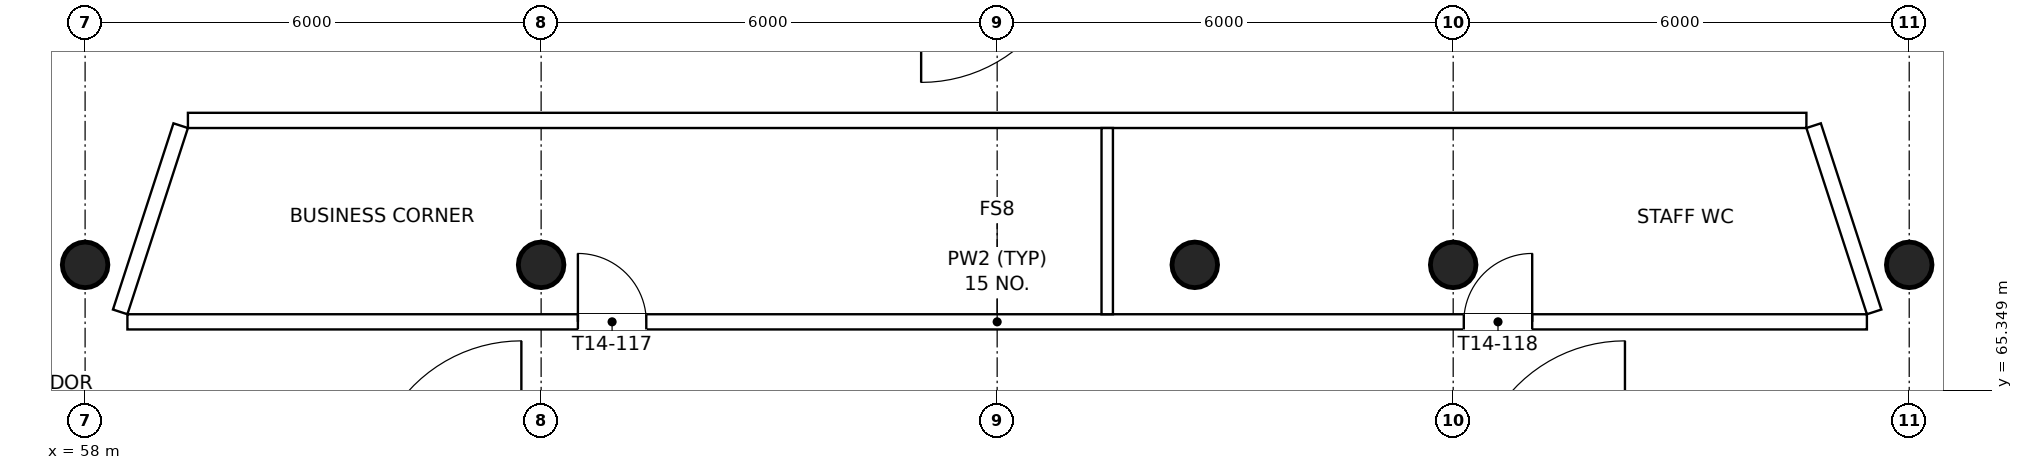
"""IFC4 building model, lengths in metres.
Left out: names, types, materials, properties, quantities, classifications, styles, units other than length and angle.
Written with IfcOpenShell. Run it as: python <this file> out.ifc"""

import sys

from ifc_helpers import new_model, si_unit, direction, frame, frame_2d, origin, origin_2d, place, context, subcontext, project, spatial, rectangle, circle, extrude, element, fill, save


model = new_model("IFC4")
c1 = context("Model", 3, precision=1e-05, world=origin(), true_north=direction((0.0, 1.0)))
c2 = subcontext(c1, "Body", "Model", "MODEL_VIEW")
j1 = project(units=[si_unit("LENGTHUNIT", "METRE"), si_unit("PLANEANGLEUNIT", "RADIAN")], contexts=[c1])
p1 = place(None, origin())
s1 = spatial("IfcSite", under=j1, at=p1, CompositionType="ELEMENT")
p2 = place(p1, origin())
s2 = spatial("IfcBuilding", under=s1, at=p2, CompositionType="ELEMENT")
p3 = place(p2, frame((0.0, 0.0, 204.3)))
s3 = spatial("IfcBuildingStorey", under=s2, at=p3, CompositionType="ELEMENT", Elevation=204.3)
for number, where, z_axis, x_axis in (
    (1, (58.0, 67.0, 0.0), (0.0, 0.0, 1.0), (1.0, 0.0, 0.0)),
    (2, (64.0, 67.0, 0.0), (0.0, 0.0, 1.0), (1.0, 0.0, 0.0)),
    (3, (72.6, 67.0, 0.0), (0.0, 0.0, 1.0), (1.0, 0.0, 0.0)),
    (4, (76.0, 67.0, 0.0), (0.0, 0.0, 1.0), (1.0, 0.0, 0.0)),
    (5, (82.0, 67.0, 0.0), (0.0, 0.0, 1.0), (1.0, 0.0, 0.0)),
):
    element("IfcColumn", number, at=place(p3, frame(where, z_axis=z_axis, x_axis=x_axis)), inside=s3, PredefinedType="COLUMN", context=c2, shape_type="SweptSolid", body=[
        extrude(circle(Radius=0.3, at=origin_2d()), origin(), (0.0, 0.0, 1.0), 3.9),
    ])
p4 = place(p3, frame((58.557, 66.25, 0.0), z_axis=(0.0, 0.0, 1.0), x_axis=(1.0, 0.0, 0.0)))
e6 = element("IfcWall", 6, at=p4, inside=s3, PredefinedType="PARTITIONING", context=c2, shape_type="SweptSolid", body=[
    extrude(rectangle(XDim=22.887, YDim=0.2, at=frame_2d((11.443, 0.0))), origin(), (0.0, 0.0, 1.0), 3.6),
])
p5 = place(p4, frame((5.927, 0.0, 0.0)))
e7 = element("IfcOpeningElement", 7, at=p5, cuts=e6, PredefinedType="OPENING", context=c2, shape_type="SweptSolid", body=[
    extrude(rectangle(XDim=0.9, YDim=2.1, at=frame_2d((0.45, 1.05))), frame((0.0, 0.11, 0.0), z_axis=(0.0, -1.0, 0.0), x_axis=(1.0, 0.0, 0.0)), (0.0, 0.0, 1.0), 0.22),
])
p6 = place(p4, frame((17.583, 0.0, 0.0)))
e8 = element("IfcOpeningElement", 8, at=p6, cuts=e6, PredefinedType="OPENING", context=c2, shape_type="SweptSolid", body=[
    extrude(rectangle(XDim=0.9, YDim=2.1, at=frame_2d((0.45, 1.05))), frame((0.0, 0.11, 0.0), z_axis=(0.0, -1.0, 0.0), x_axis=(1.0, 0.0, 0.0)), (0.0, 0.0, 1.0), 0.22),
])
p7 = place(p3, frame((81.538, 66.381, 0.0), z_axis=(0.0, 0.0, 1.0), x_axis=(-0.309053927645, 0.951044515155, 0.0)))
e9 = element("IfcWall", 9, at=p7, inside=s3, PredefinedType="PARTITIONING", context=c2, shape_type="SweptSolid", body=[
    extrude(rectangle(XDim=2.576, YDim=0.2, at=frame_2d((1.288, 0.0))), origin(), (0.0, 0.0, 1.0), 3.6),
])
p8 = place(p3, frame((80.647, 68.9, 0.0), z_axis=(0.0, 0.0, 1.0), x_axis=(-1.0, 0.0, 0.0)))
e10 = element("IfcWall", 10, at=p8, inside=s3, PredefinedType="PARTITIONING", context=c2, shape_type="SweptSolid", body=[
    extrude(rectangle(XDim=21.294, YDim=0.2, at=frame_2d((10.647, 0.0))), origin(), (0.0, 0.0, 1.0), 3.6),
])
p9 = place(p3, frame((59.258, 68.831, 0.0), z_axis=(0.0, 0.0, 1.0), x_axis=(-0.309053927645, -0.951044515155, 0.0)))
e11 = element("IfcWall", 11, at=p9, inside=s3, PredefinedType="PARTITIONING", context=c2, shape_type="SweptSolid", body=[
    extrude(rectangle(XDim=2.576, YDim=0.2, at=frame_2d((1.288, 0.0))), origin(), (0.0, 0.0, 1.0), 3.6),
])
p10 = place(p3, frame((71.448, 66.35, 0.0), z_axis=(0.0, 0.0, 1.0), x_axis=(0.0, 1.0, 0.0)))
e12 = element("IfcWall", 12, at=p10, inside=s3, PredefinedType="PARTITIONING", context=c2, shape_type="SweptSolid", body=[
    extrude(rectangle(XDim=2.45, YDim=0.15, at=frame_2d((1.225, 0.0))), origin(), (0.0, 0.0, 1.0), 3.6),
])
p11 = place(p5, origin())
e13 = element("IfcDoor", 13, at=p11, inside=s3, OperationType="SINGLE_SWING_LEFT", PredefinedType="DOOR", context=c2, shape_type="SweptSolid", body=[
    extrude(rectangle(XDim=0.9, YDim=2.1, at=frame_2d((0.45, 1.05))), frame((0.0, 0.025, 0.0), z_axis=(0.0, -1.0, 0.0), x_axis=(1.0, 0.0, 0.0)), (0.0, 0.0, 1.0), 0.05),
])
fill(e7, e13)
p12 = place(p6, origin())
e14 = element("IfcDoor", 14, at=p12, inside=s3, OperationType="SINGLE_SWING_RIGHT", PredefinedType="DOOR", context=c2, shape_type="SweptSolid", body=[
    extrude(rectangle(XDim=0.9, YDim=2.1, at=frame_2d((0.45, 1.05))), frame((0.0, 0.025, 0.0), z_axis=(0.0, -1.0, 0.0), x_axis=(1.0, 0.0, 0.0)), (0.0, 0.0, 1.0), 0.05),
])
fill(e8, e14)
save(model, sys.argv[1])
